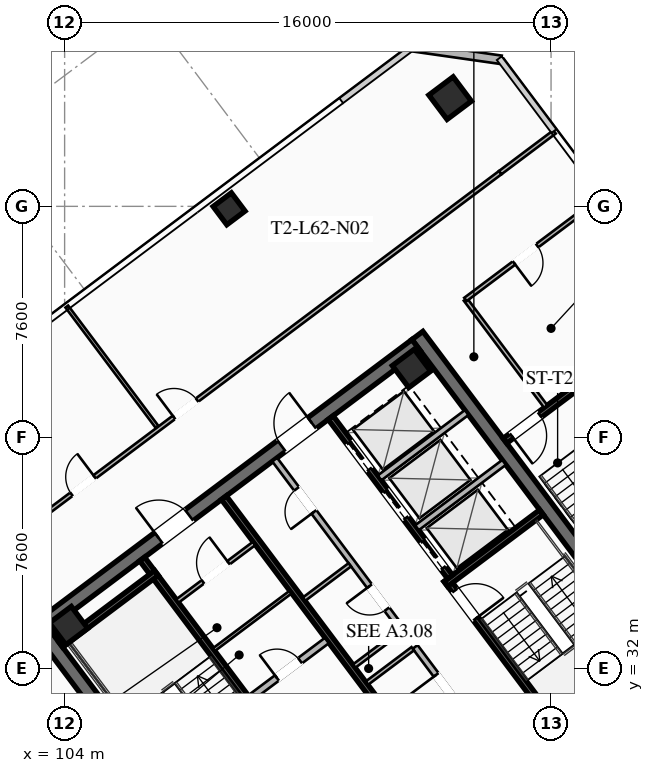
"""IFC4 building model, lengths in metres.
Left out: names, types, materials, properties, quantities, classifications, styles, units other than length and angle.
Written with IfcOpenShell. Run it as: python <this file> out.ifc"""

import sys

from ifc_helpers import new_model, si_unit, direction, frame, frame_2d, origin, origin_2d, place, context, subcontext, project, spatial, rectangle, hollow_rectangle, extrude, element, fill, save


model = new_model("IFC4")
c1 = context("Model", 3, precision=1e-05, world=origin(), true_north=direction((0.0, 1.0)))
c2 = subcontext(c1, "Body", "Model", "MODEL_VIEW")
j1 = project(units=[si_unit("LENGTHUNIT", "METRE"), si_unit("PLANEANGLEUNIT", "RADIAN")], contexts=[c1])
p1 = place(None, origin())
s1 = spatial("IfcSite", under=j1, at=p1, CompositionType="ELEMENT")
p2 = place(p1, origin())
s2 = spatial("IfcBuilding", under=s1, at=p2, CompositionType="ELEMENT")
p3 = place(p2, frame((0.0, 0.0, 229.05)))
s3 = spatial("IfcBuildingStorey", under=s2, at=p3, CompositionType="ELEMENT", Elevation=229.05)
for number, where, z_axis, x_axis in (
    (1, (112.396, 21.047, 0.0), (0.0, 0.0, 1.0), (-0.6, 0.8, 0.0)),
    (2, (115.604, 42.953, 0.0), (0.0, 0.0, 1.0), (0.6, -0.8, 0.0)),
):
    element("IfcWall", number, at=place(p3, frame(where, z_axis=z_axis, x_axis=x_axis)), inside=s3, PredefinedType="SHEAR", context=c2, shape_type="SweptSolid", body=[
        extrude(rectangle(XDim=15.6, YDim=0.45, at=frame_2d((7.8, 0.0))), origin(), (0.0, 0.0, 1.0), 3.55),
    ])
p4 = place(p3, frame((103.351, 33.482, 0.0), z_axis=(0.0, 0.0, 1.0), x_axis=(0.8, 0.6, 0.0)))
e3 = element("IfcWall", 3, at=p4, inside=s3, PredefinedType="SHEAR", context=c2, shape_type="SweptSolid", body=[
    extrude(rectangle(XDim=15.26, YDim=0.45, at=frame_2d((7.63, 0.0))), origin(), (0.0, 0.0, 1.0), 3.55),
])
p5 = place(p4, frame((4.68, 0.0, 0.0)))
e4 = element("IfcOpeningElement", 4, at=p5, cuts=e3, PredefinedType="OPENING", context=c2, shape_type="SweptSolid", body=[
    extrude(rectangle(XDim=1.25, YDim=2.25, at=frame_2d((0.625, 1.125))), frame((0.0, 0.235, 0.0), z_axis=(0.0, -1.0, 0.0), x_axis=(1.0, 0.0, 0.0)), (0.0, 0.0, 1.0), 0.47),
])
p6 = place(p4, frame((9.73, 0.0, 0.0)))
e5 = element("IfcOpeningElement", 5, at=p6, cuts=e3, PredefinedType="OPENING", context=c2, shape_type="SweptSolid", body=[
    extrude(rectangle(XDim=1.25, YDim=2.25, at=frame_2d((0.625, 1.125))), frame((0.0, 0.235, 0.0), z_axis=(0.0, -1.0, 0.0), x_axis=(1.0, 0.0, 0.0)), (0.0, 0.0, 1.0), 0.47),
])
for number, where, z_axis, x_axis in (
    (6, (115.41, 41.87, 0.0), (0.0, 0.0, 1.0), (0.8, 0.6, 0.0)),
    (7, (104.13, 33.41, 0.0), (0.0, 0.0, 1.0), (0.8, 0.6, 0.0)),
):
    element("IfcColumn", number, at=place(p3, frame(where, z_axis=z_axis, x_axis=x_axis)), inside=s3, PredefinedType="COLUMN", context=c2, shape_type="SweptSolid", body=[
        extrude(hollow_rectangle(XDim=0.9, YDim=0.9, WallThickness=0.04, at=origin_2d()), origin(), (0.0, 0.0, 1.0), 3.37),
    ])
p7 = place(p3, frame((116.68, 50.76, 0.0), z_axis=(0.0, 0.0, 1.0), x_axis=(0.799999996291, 0.600000004945, 0.0)))
e8 = element("IfcColumn", 8, at=p7, inside=s3, PredefinedType="COLUMN", context=c2, shape_type="SweptSolid", body=[
    extrude(hollow_rectangle(XDim=1.0, YDim=1.0, WallThickness=0.04, at=origin_2d()), origin(), (0.0, 0.0, 1.0), 3.37),
])
p8 = place(p3, frame((109.41, 47.12, 0.0), z_axis=(0.0, 0.0, 1.0), x_axis=(0.799999996291, 0.600000004945, 0.0)))
e9 = element("IfcColumn", 9, at=p8, inside=s3, PredefinedType="COLUMN", context=c2, shape_type="SweptSolid", body=[
    extrude(hollow_rectangle(XDim=0.75, YDim=0.75, WallThickness=0.032, at=origin_2d()), origin(), (0.0, 0.0, 1.0), 3.37),
])
p9 = place(p3, frame((115.42, 52.44, 0.0), z_axis=(0.0, 0.0, 1.0), x_axis=(0.989954425158, -0.14138683146, 0.0)))
e10 = element("IfcWall", 10, at=p9, inside=s3, PredefinedType="SOLIDWALL", context=c2, shape_type="SweptSolid", body=[
    extrude(rectangle(XDim=2.97, YDim=0.28, at=frame_2d((1.485, 0.0))), origin(), (0.0, 0.0, 1.0), 3.37),
])
p10 = place(p3, frame((111.44, 29.08, 0.0), z_axis=(0.0, 0.0, 1.0), x_axis=(-0.59999041401, 0.800007189403, 0.0)))
e11 = element("IfcWall", 11, at=p10, inside=s3, PredefinedType="SHEAR", context=c2, shape_type="SweptSolid", body=[
    extrude(rectangle(XDim=8.15, YDim=0.2, at=frame_2d((4.075, 0.0))), origin(), (0.0, 0.0, 1.0), 3.37),
])
p11 = place(p10, frame((0.45, 0.0, 0.0)))
e12 = element("IfcOpeningElement", 12, at=p11, cuts=e11, PredefinedType="OPENING", context=c2, shape_type="SweptSolid", body=[
    extrude(rectangle(XDim=1.15, YDim=2.2, at=frame_2d((0.575, 1.1))), frame((0.0, 0.11, 0.0), z_axis=(0.0, -1.0, 0.0), x_axis=(1.0, 0.0, 0.0)), (0.0, 0.0, 1.0), 0.22),
])
p12 = place(p3, frame((103.876, 32.782, 0.0), z_axis=(0.0, 0.0, 1.0), x_axis=(0.800014909178, 0.599980120581, 0.0)))
e13 = element("IfcWall", 13, at=p12, inside=s3, PredefinedType="SHEAR", context=c2, shape_type="SweptSolid", body=[
    extrude(rectangle(XDim=3.93, YDim=0.2, at=frame_2d((1.965, 0.0))), origin(), (0.0, 0.0, 1.0), 3.37),
])
p13 = place(p3, frame((116.56, 34.92, 0.0), z_axis=(0.0, 0.0, 1.0), x_axis=(0.59999041401, -0.800007189403, 0.0)))
e14 = element("IfcWall", 14, at=p13, inside=s3, PredefinedType="SHEAR", context=c2, shape_type="SweptSolid", body=[
    extrude(rectangle(XDim=8.15, YDim=0.2, at=frame_2d((4.075, 0.0))), origin(), (0.0, 0.0, 1.0), 3.37),
])
p14 = place(p13, frame((0.45, 0.0, 0.0)))
e15 = element("IfcOpeningElement", 15, at=p14, cuts=e14, PredefinedType="OPENING", context=c2, shape_type="SweptSolid", body=[
    extrude(rectangle(XDim=1.15, YDim=2.2, at=frame_2d((0.575, 1.1))), frame((0.0, 0.11, 0.0), z_axis=(0.0, -1.0, 0.0), x_axis=(1.0, 0.0, 0.0)), (0.0, 0.0, 1.0), 0.22),
])
p15 = place(p3, frame((116.54, 34.78, 0.0), z_axis=(0.0, 0.0, 1.0), x_axis=(0.800014909178, 0.599980120581, 0.0)))
e16 = element("IfcWall", 16, at=p15, inside=s3, PredefinedType="SHEAR", context=c2, shape_type="SweptSolid", body=[
    extrude(rectangle(XDim=3.93, YDim=0.2, at=frame_2d((1.965, 0.0))), origin(), (0.0, 0.0, 1.0), 3.37),
])
p16 = place(p3, frame((118.058, 25.856, 0.0), z_axis=(0.0, 0.0, 1.0), x_axis=(-0.600002657301, 0.799998007018, 0.0)))
e17 = element("IfcWall", 17, at=p16, inside=s3, PredefinedType="SHEAR", context=c2, shape_type="SweptSolid", body=[
    extrude(rectangle(XDim=14.7, YDim=0.2, at=frame_2d((7.35, 0.0))), origin(), (0.0, 0.0, 1.0), 3.37),
])
p17 = place(p3, frame((110.104, 31.028, 0.0), z_axis=(0.0, 0.0, 1.0), x_axis=(0.800018601094, 0.59997519774, 0.0)))
e18 = element("IfcWall", 18, at=p17, inside=s3, PredefinedType="SOLIDWALL", context=c2, shape_type="SweptSolid", body=[
    extrude(rectangle(XDim=3.15, YDim=0.22, at=frame_2d((1.575, 0.0))), origin(), (0.0, 0.0, 1.0), 2.513),
])
p18 = place(p17, frame((1.1, 0.0, 0.0)))
e19 = element("IfcOpeningElement", 19, at=p18, cuts=e18, PredefinedType="OPENING", context=c2, shape_type="SweptSolid", body=[
    extrude(rectangle(XDim=0.95, YDim=2.05, at=frame_2d((0.475, 1.025))), frame((0.0, 0.12, 0.0), z_axis=(0.0, -1.0, 0.0), x_axis=(1.0, 0.0, 0.0)), (0.0, 0.0, 1.0), 0.24),
])
p19 = place(p3, frame((112.75, 40.25, 0.0), z_axis=(0.0, 0.0, 1.0), x_axis=(0.599994036198, -0.800004472816, 0.0)))
e20 = element("IfcWall", 20, at=p19, inside=s3, PredefinedType="SHEAR", context=c2, shape_type="SweptSolid", body=[
    extrude(rectangle(XDim=6.55, YDim=0.2, at=frame_2d((3.275, 0.0))), origin(), (0.0, 0.0, 1.0), 3.37),
])
p20 = place(p19, frame((5.075, 0.0, 0.0)))
e21 = element("IfcOpeningElement", 21, at=p20, cuts=e20, PredefinedType="OPENING", context=c2, shape_type="SweptSolid", body=[
    extrude(rectangle(XDim=1.1, YDim=2.2, at=frame_2d((0.55, 1.1))), frame((0.0, 0.11, 0.0), z_axis=(0.0, -1.0, 0.0), x_axis=(1.0, 0.0, 0.0)), (0.0, 0.0, 1.0), 0.22),
])
p21 = place(p19, frame((3.025, 0.0, 0.0)))
e22 = element("IfcOpeningElement", 22, at=p21, cuts=e20, PredefinedType="OPENING", context=c2, shape_type="SweptSolid", body=[
    extrude(rectangle(XDim=1.1, YDim=2.2, at=frame_2d((0.55, 1.1))), frame((0.0, 0.11, 0.0), z_axis=(0.0, -1.0, 0.0), x_axis=(1.0, 0.0, 0.0)), (0.0, 0.0, 1.0), 0.22),
])
p22 = place(p19, frame((1.025, 0.0, 0.0)))
e23 = element("IfcOpeningElement", 23, at=p22, cuts=e20, PredefinedType="OPENING", context=c2, shape_type="SweptSolid", body=[
    extrude(rectangle(XDim=1.1, YDim=2.2, at=frame_2d((0.55, 1.1))), frame((0.0, 0.11, 0.0), z_axis=(0.0, -1.0, 0.0), x_axis=(1.0, 0.0, 0.0)), (0.0, 0.0, 1.0), 0.22),
])
for number, where, z_axis, x_axis in (
    (24, (115.59, 36.63, 0.0), (0.0, 0.0, 1.0), (0.8, 0.6, 0.0)),
    (25, (114.36, 38.27, 0.0), (0.0, 0.0, 1.0), (0.8, 0.6, 0.0)),
):
    element("IfcWall", number, at=place(p3, frame(where, z_axis=z_axis, x_axis=x_axis)), inside=s3, PredefinedType="SOLIDWALL", context=c2, shape_type="SweptSolid", body=[
        extrude(rectangle(XDim=3.58, YDim=0.2, at=frame_2d((1.79, 0.0))), origin(), (0.0, 0.0, 1.0), 3.37),
    ])
p23 = place(p3, frame((107.71, 34.22, 0.0), z_axis=(0.0, 0.0, 1.0), x_axis=(0.799981399002, 0.60002480053, 0.0)))
e26 = element("IfcWall", 26, at=p23, inside=s3, PredefinedType="PARTITIONING", context=c2, shape_type="SweptSolid", body=[
    extrude(rectangle(XDim=3.15, YDim=0.135, at=frame_2d((1.575, 0.0))), origin(), (0.0, 0.0, 1.0), 2.513),
])
p24 = place(p23, frame((1.05, 0.0, 0.0)))
e27 = element("IfcOpeningElement", 27, at=p24, cuts=e26, PredefinedType="OPENING", context=c2, shape_type="SweptSolid", body=[
    extrude(rectangle(XDim=1.05, YDim=2.2, at=frame_2d((0.525, 1.1))), frame((0.0, 0.077, 0.0), z_axis=(0.0, -1.0, 0.0), x_axis=(1.0, 0.0, 0.0)), (0.0, 0.0, 1.0), 0.155),
])
p25 = place(p3, frame((108.91, 32.62, 0.0), z_axis=(0.0, 0.0, 1.0), x_axis=(0.800018601094, 0.59997519774, 0.0)))
e28 = element("IfcWall", 28, at=p25, inside=s3, PredefinedType="PARTITIONING", context=c2, shape_type="SweptSolid", body=[
    extrude(rectangle(XDim=3.15, YDim=0.11, at=frame_2d((1.575, 0.0))), origin(), (0.0, 0.0, 1.0), 2.513),
])
p26 = place(p3, frame((119.73, 27.11, 0.0), z_axis=(0.0, 0.0, 1.0), x_axis=(-0.600005580459, 0.799995814625, 0.0)))
e29 = element("IfcWall", 29, at=p26, inside=s3, PredefinedType="SOLIDWALL", context=c2, shape_type="SweptSolid", body=[
    extrude(rectangle(XDim=7.0, YDim=0.2, at=frame_2d((3.5, 0.0))), origin(), (0.0, 0.0, 1.0), 2.513),
])
p27 = place(p26, frame((0.85, 0.0, 0.0)))
e30 = element("IfcOpeningElement", 30, at=p27, cuts=e29, PredefinedType="OPENING", context=c2, shape_type="SweptSolid", body=[
    extrude(rectangle(XDim=0.95, YDim=2.05, at=frame_2d((0.475, 1.025))), frame((0.0, 0.11, 0.0), z_axis=(0.0, -1.0, 0.0), x_axis=(1.0, 0.0, 0.0)), (0.0, 0.0, 1.0), 0.22),
])
p28 = place(p26, frame((4.8, 0.0, 0.0)))
e31 = element("IfcOpeningElement", 31, at=p28, cuts=e29, PredefinedType="OPENING", context=c2, shape_type="SweptSolid", body=[
    extrude(rectangle(XDim=1.05, YDim=2.2, at=frame_2d((0.525, 1.1))), frame((0.0, 0.11, 0.0), z_axis=(0.0, -1.0, 0.0), x_axis=(1.0, 0.0, 0.0)), (0.0, 0.0, 1.0), 0.22),
])
p29 = place(p3, frame((113.946, 31.522, 0.0), z_axis=(0.0, 0.0, 1.0), x_axis=(0.8, 0.6, 0.0)))
e32 = element("IfcWall", 32, at=p29, inside=s3, PredefinedType="PARTITIONING", context=c2, shape_type="SweptSolid", body=[
    extrude(rectangle(XDim=1.88, YDim=0.135, at=frame_2d((0.94, 0.0))), origin(), (0.0, 0.0, 1.0), 2.513),
])
p30 = place(p3, frame((115.11, 33.27, 0.0), z_axis=(0.0, 0.0, 1.0), x_axis=(-0.600011160345, 0.79999162962, 0.0)))
e33 = element("IfcWall", 33, at=p30, inside=s3, PredefinedType="SOLIDWALL", context=c2, shape_type="SweptSolid", body=[
    extrude(rectangle(XDim=7.0, YDim=0.2, at=frame_2d((3.5, 0.0))), origin(), (0.0, 0.0, 1.0), 2.513),
])
p31 = place(p30, frame((0.85, 0.0, 0.0)))
e34 = element("IfcOpeningElement", 34, at=p31, cuts=e33, PredefinedType="OPENING", context=c2, shape_type="SweptSolid", body=[
    extrude(rectangle(XDim=0.95, YDim=2.05, at=frame_2d((0.475, 1.025))), frame((0.0, 0.11, 0.0), z_axis=(0.0, -1.0, 0.0), x_axis=(1.0, 0.0, 0.0)), (0.0, 0.0, 1.0), 0.22),
])
p32 = place(p30, frame((4.85, 0.0, 0.0)))
e35 = element("IfcOpeningElement", 35, at=p32, cuts=e33, PredefinedType="OPENING", context=c2, shape_type="SweptSolid", body=[
    extrude(rectangle(XDim=0.95, YDim=2.05, at=frame_2d((0.475, 1.025))), frame((0.0, 0.11, 0.0), z_axis=(0.0, -1.0, 0.0), x_axis=(1.0, 0.0, 0.0)), (0.0, 0.0, 1.0), 0.22),
])
p33 = place(p3, frame((113.526, 32.082, 0.0), z_axis=(0.0, 0.0, 1.0), x_axis=(0.800046745961, 0.599937666993, 0.0)))
e36 = element("IfcWall", 36, at=p33, inside=s3, PredefinedType="PARTITIONING", context=c2, shape_type="SweptSolid", body=[
    extrude(rectangle(XDim=1.88, YDim=0.135, at=frame_2d((0.94, 0.0))), origin(), (0.0, 0.0, 1.0), 2.513),
])
p34 = place(p3, frame((111.876, 34.282, 0.0), z_axis=(0.0, 0.0, 1.0), x_axis=(0.8, 0.6, 0.0)))
e37 = element("IfcWall", 37, at=p34, inside=s3, PredefinedType="PARTITIONING", context=c2, shape_type="SweptSolid", body=[
    extrude(rectangle(XDim=1.88, YDim=0.135, at=frame_2d((0.94, 0.0))), origin(), (0.0, 0.0, 1.0), 2.513),
])
p35 = place(p3, frame((121.204, 41.528, 0.0), z_axis=(0.0, 0.0, 1.0), x_axis=(-0.800017232136, -0.599977023131, 0.0)))
e38 = element("IfcWall", 38, at=p35, inside=s3, PredefinedType="SHEAR", context=c2, shape_type="SweptSolid", body=[
    extrude(rectangle(XDim=3.4, YDim=0.2, at=frame_2d((1.7, 0.0))), origin(), (0.0, 0.0, 1.0), 3.37),
])
p36 = place(p35, frame((1.975, 0.0, 0.0)))
e39 = element("IfcOpeningElement", 39, at=p36, cuts=e38, PredefinedType="OPENING", context=c2, shape_type="SweptSolid", body=[
    extrude(rectangle(XDim=1.15, YDim=2.2, at=frame_2d((0.575, 1.1))), frame((0.0, 0.11, 0.0), z_axis=(0.0, -1.0, 0.0), x_axis=(1.0, 0.0, 0.0)), (0.0, 0.0, 1.0), 0.22),
])
p37 = place(p3, frame((119.824, 40.618, 0.0), z_axis=(0.0, 0.0, 1.0), x_axis=(-0.599982243973, 0.800013316712, 0.0)))
e40 = element("IfcWall", 40, at=p37, inside=s3, PredefinedType="PARTITIONING", context=c2, shape_type="SweptSolid", body=[
    extrude(rectangle(XDim=4.4, YDim=0.135, at=frame_2d((2.2, 0.0))), origin(), (0.0, 0.0, 1.0), 2.513),
])
p38 = place(p3, frame((98.586, 33.502, 0.0), z_axis=(0.0, 0.0, 1.0), x_axis=(0.8, 0.6, 0.0)))
e41 = element("IfcWall", 41, at=p38, inside=s3, PredefinedType="PARTITIONING", context=c2, shape_type="SweptSolid", body=[
    extrude(rectangle(XDim=24.68, YDim=0.135, at=frame_2d((12.34, 0.0))), origin(), (0.0, 0.0, 1.0), 2.513),
])
p39 = place(p38, frame((7.05, 0.0, 0.0)))
e42 = element("IfcOpeningElement", 42, at=p39, cuts=e41, PredefinedType="OPENING", context=c2, shape_type="SweptSolid", body=[
    extrude(rectangle(XDim=0.95, YDim=2.05, at=frame_2d((0.475, 1.025))), frame((0.0, 0.077, 0.0), z_axis=(0.0, -1.0, 0.0), x_axis=(1.0, 0.0, 0.0)), (0.0, 0.0, 1.0), 0.155),
])
p40 = place(p38, frame((11.263, 0.0, 0.0)))
e43 = element("IfcOpeningElement", 43, at=p40, cuts=e41, PredefinedType="OPENING", context=c2, shape_type="SweptSolid", body=[
    extrude(rectangle(XDim=0.95, YDim=2.05, at=frame_2d((0.475, 1.025))), frame((0.0, 0.077, 0.0), z_axis=(0.0, -1.0, 0.0), x_axis=(1.0, 0.0, 0.0)), (0.0, 0.0, 1.0), 0.155),
])
p41 = place(p3, frame((118.33, 48.31, 0.0), z_axis=(0.0, 0.0, 1.0), x_axis=(0.800013138111, 0.599982482119, 0.0)))
e44 = element("IfcWall", 44, at=p41, inside=s3, PredefinedType="PARTITIONING", context=c2, shape_type="SweptSolid", body=[
    extrude(rectangle(XDim=2.23, YDim=0.135, at=frame_2d((1.115, 0.0))), origin(), (0.0, 0.0, 1.0), 2.513),
])
p42 = place(p3, frame((107.042, 39.944, 0.0), z_axis=(0.0, 0.0, 1.0), x_axis=(-0.6, 0.8, 0.0)))
e45 = element("IfcWall", 45, at=p42, inside=s3, PredefinedType="PARTITIONING", context=c2, shape_type="SweptSolid", body=[
    extrude(rectangle(XDim=4.95, YDim=0.11, at=frame_2d((2.475, 0.0))), origin(), (0.0, 0.0, 1.0), 2.513),
])
p43 = place(p3, frame((121.704, 47.528, 0.0), z_axis=(0.0, 0.0, 1.0), x_axis=(-0.799989629485, -0.600013827105, 0.0)))
e46 = element("IfcWall", 46, at=p43, inside=s3, PredefinedType="PARTITIONING", context=c2, shape_type="SweptSolid", body=[
    extrude(rectangle(XDim=5.65, YDim=0.135, at=frame_2d((2.825, 0.0))), origin(), (0.0, 0.0, 1.0), 2.513),
])
p44 = place(p43, frame((2.7, 0.0, 0.0)))
e47 = element("IfcOpeningElement", 47, at=p44, cuts=e46, PredefinedType="OPENING", context=c2, shape_type="SweptSolid", body=[
    extrude(rectangle(XDim=0.95, YDim=2.05, at=frame_2d((0.475, 1.025))), frame((0.0, 0.077, 0.0), z_axis=(0.0, -1.0, 0.0), x_axis=(1.0, 0.0, 0.0)), (0.0, 0.0, 1.0), 0.155),
])
p45 = place(p3, frame((111.63, 16.11, 0.0), z_axis=(0.0, 0.0, 1.0), x_axis=(-0.599998196544, 0.800001352589, 0.0)))
e48 = element("IfcWall", 48, at=p45, inside=s3, PredefinedType="PARTITIONING", context=c2, shape_type="SweptSolid", body=[
    extrude(rectangle(XDim=21.66, YDim=0.135, at=frame_2d((10.83, 0.0))), origin(), (0.0, 0.0, 1.0), 2.513),
])
p46 = place(p45, frame((11.109, 0.0, 0.0)))
e49 = element("IfcOpeningElement", 49, at=p46, cuts=e48, PredefinedType="OPENING", context=c2, shape_type="SweptSolid", body=[
    extrude(rectangle(XDim=0.95, YDim=2.05, at=frame_2d((0.475, 1.025))), frame((0.0, 0.077, 0.0), z_axis=(0.0, -1.0, 0.0), x_axis=(1.0, 0.0, 0.0)), (0.0, 0.0, 1.0), 0.155),
])
p47 = place(p5, origin())
e50 = element("IfcDoor", 50, at=p47, inside=s3, OperationType="SINGLE_SWING_LEFT", PredefinedType="DOOR", context=c2, shape_type="SweptSolid", body=[
    extrude(rectangle(XDim=1.25, YDim=2.25, at=frame_2d((0.625, 1.125))), frame((0.0, 0.025, 0.0), z_axis=(0.0, -1.0, 0.0), x_axis=(1.0, 0.0, 0.0)), (0.0, 0.0, 1.0), 0.05),
])
fill(e4, e50)
p48 = place(p6, origin())
e51 = element("IfcDoor", 51, at=p48, inside=s3, OperationType="SINGLE_SWING_RIGHT", PredefinedType="DOOR", context=c2, shape_type="SweptSolid", body=[
    extrude(rectangle(XDim=1.25, YDim=2.25, at=frame_2d((0.625, 1.125))), frame((0.0, 0.025, 0.0), z_axis=(0.0, -1.0, 0.0), x_axis=(1.0, 0.0, 0.0)), (0.0, 0.0, 1.0), 0.05),
])
fill(e5, e51)
p49 = place(p14, origin())
e52 = element("IfcDoor", 52, at=p49, inside=s3, OperationType="SINGLE_SWING_RIGHT", PredefinedType="DOOR", context=c2, shape_type="SweptSolid", body=[
    extrude(rectangle(XDim=1.15, YDim=2.2, at=frame_2d((0.575, 1.1))), frame((0.0, 0.025, 0.0), z_axis=(0.0, -1.0, 0.0), x_axis=(1.0, 0.0, 0.0)), (0.0, 0.0, 1.0), 0.05),
])
fill(e15, e52)
p50 = place(p24, origin())
e53 = element("IfcDoor", 53, at=p50, inside=s3, OperationType="SINGLE_SWING_RIGHT", PredefinedType="DOOR", context=c2, shape_type="SweptSolid", body=[
    extrude(rectangle(XDim=1.05, YDim=2.2, at=frame_2d((0.525, 1.1))), frame((0.0, 0.025, 0.0), z_axis=(0.0, -1.0, 0.0), x_axis=(1.0, 0.0, 0.0)), (0.0, 0.0, 1.0), 0.05),
])
fill(e27, e53)
p51 = place(p18, origin())
e54 = element("IfcDoor", 54, at=p51, inside=s3, OperationType="SINGLE_SWING_LEFT", PredefinedType="DOOR", context=c2, shape_type="SweptSolid", body=[
    extrude(rectangle(XDim=0.95, YDim=2.05, at=frame_2d((0.475, 1.025))), frame((0.0, 0.025, 0.0), z_axis=(0.0, -1.0, 0.0), x_axis=(1.0, 0.0, 0.0)), (0.0, 0.0, 1.0), 0.05),
])
fill(e19, e54)
p52 = place(p28, origin())
e55 = element("IfcDoor", 55, at=p52, inside=s3, OperationType="SINGLE_SWING_RIGHT", PredefinedType="DOOR", context=c2, shape_type="SweptSolid", body=[
    extrude(rectangle(XDim=1.05, YDim=2.2, at=frame_2d((0.525, 1.1))), frame((0.0, 0.025, 0.0), z_axis=(0.0, -1.0, 0.0), x_axis=(1.0, 0.0, 0.0)), (0.0, 0.0, 1.0), 0.05),
])
fill(e31, e55)
p53 = place(p31, origin())
e56 = element("IfcDoor", 56, at=p53, inside=s3, OperationType="SINGLE_SWING_RIGHT", PredefinedType="DOOR", context=c2, shape_type="SweptSolid", body=[
    extrude(rectangle(XDim=0.95, YDim=2.05, at=frame_2d((0.475, 1.025))), frame((0.0, 0.025, 0.0), z_axis=(0.0, -1.0, 0.0), x_axis=(1.0, 0.0, 0.0)), (0.0, 0.0, 1.0), 0.05),
])
fill(e34, e56)
p54 = place(p32, origin())
e57 = element("IfcDoor", 57, at=p54, inside=s3, OperationType="SINGLE_SWING_LEFT", PredefinedType="DOOR", context=c2, shape_type="SweptSolid", body=[
    extrude(rectangle(XDim=0.95, YDim=2.05, at=frame_2d((0.475, 1.025))), frame((0.0, 0.025, 0.0), z_axis=(0.0, -1.0, 0.0), x_axis=(1.0, 0.0, 0.0)), (0.0, 0.0, 1.0), 0.05),
])
fill(e35, e57)
p55 = place(p36, origin())
e58 = element("IfcDoor", 58, at=p55, inside=s3, OperationType="SINGLE_SWING_RIGHT", PredefinedType="DOOR", context=c2, shape_type="SweptSolid", body=[
    extrude(rectangle(XDim=1.15, YDim=2.2, at=frame_2d((0.575, 1.1))), frame((0.0, 0.025, 0.0), z_axis=(0.0, -1.0, 0.0), x_axis=(1.0, 0.0, 0.0)), (0.0, 0.0, 1.0), 0.05),
])
fill(e39, e58)
p56 = place(p39, origin())
e59 = element("IfcDoor", 59, at=p56, inside=s3, OperationType="SINGLE_SWING_RIGHT", PredefinedType="DOOR", context=c2, shape_type="SweptSolid", body=[
    extrude(rectangle(XDim=0.95, YDim=2.05, at=frame_2d((0.475, 1.025))), frame((0.0, 0.025, 0.0), z_axis=(0.0, -1.0, 0.0), x_axis=(1.0, 0.0, 0.0)), (0.0, 0.0, 1.0), 0.05),
])
fill(e42, e59)
p57 = place(p40, origin())
e60 = element("IfcDoor", 60, at=p57, inside=s3, OperationType="SINGLE_SWING_LEFT", PredefinedType="DOOR", context=c2, shape_type="SweptSolid", body=[
    extrude(rectangle(XDim=0.95, YDim=2.05, at=frame_2d((0.475, 1.025))), frame((0.0, 0.025, 0.0), z_axis=(0.0, -1.0, 0.0), x_axis=(1.0, 0.0, 0.0)), (0.0, 0.0, 1.0), 0.05),
])
fill(e43, e60)
p58 = place(p44, origin())
e61 = element("IfcDoor", 61, at=p58, inside=s3, OperationType="SINGLE_SWING_RIGHT", PredefinedType="DOOR", context=c2, shape_type="SweptSolid", body=[
    extrude(rectangle(XDim=0.95, YDim=2.05, at=frame_2d((0.475, 1.025))), frame((0.0, 0.025, 0.0), z_axis=(0.0, -1.0, 0.0), x_axis=(1.0, 0.0, 0.0)), (0.0, 0.0, 1.0), 0.05),
])
fill(e47, e61)
p59 = place(p20, origin())
e62 = element("IfcDoor", 62, at=p59, inside=s3, OperationType="SLIDING_TO_LEFT", PredefinedType="DOOR", context=c2, shape_type="SweptSolid", body=[
    extrude(rectangle(XDim=1.1, YDim=2.2, at=frame_2d((0.55, 1.1))), frame((0.0, 0.025, 0.0), z_axis=(0.0, -1.0, 0.0), x_axis=(1.0, 0.0, 0.0)), (0.0, 0.0, 1.0), 0.05),
])
fill(e21, e62)
p60 = place(p21, origin())
e63 = element("IfcDoor", 63, at=p60, inside=s3, OperationType="SLIDING_TO_LEFT", PredefinedType="DOOR", context=c2, shape_type="SweptSolid", body=[
    extrude(rectangle(XDim=1.1, YDim=2.2, at=frame_2d((0.55, 1.1))), frame((0.0, 0.025, 0.0), z_axis=(0.0, -1.0, 0.0), x_axis=(1.0, 0.0, 0.0)), (0.0, 0.0, 1.0), 0.05),
])
fill(e22, e63)
p61 = place(p22, origin())
e64 = element("IfcDoor", 64, at=p61, inside=s3, OperationType="SLIDING_TO_LEFT", PredefinedType="DOOR", context=c2, shape_type="SweptSolid", body=[
    extrude(rectangle(XDim=1.1, YDim=2.2, at=frame_2d((0.55, 1.1))), frame((0.0, 0.025, 0.0), z_axis=(0.0, -1.0, 0.0), x_axis=(1.0, 0.0, 0.0)), (0.0, 0.0, 1.0), 0.05),
])
fill(e23, e64)
save(model, sys.argv[1])
